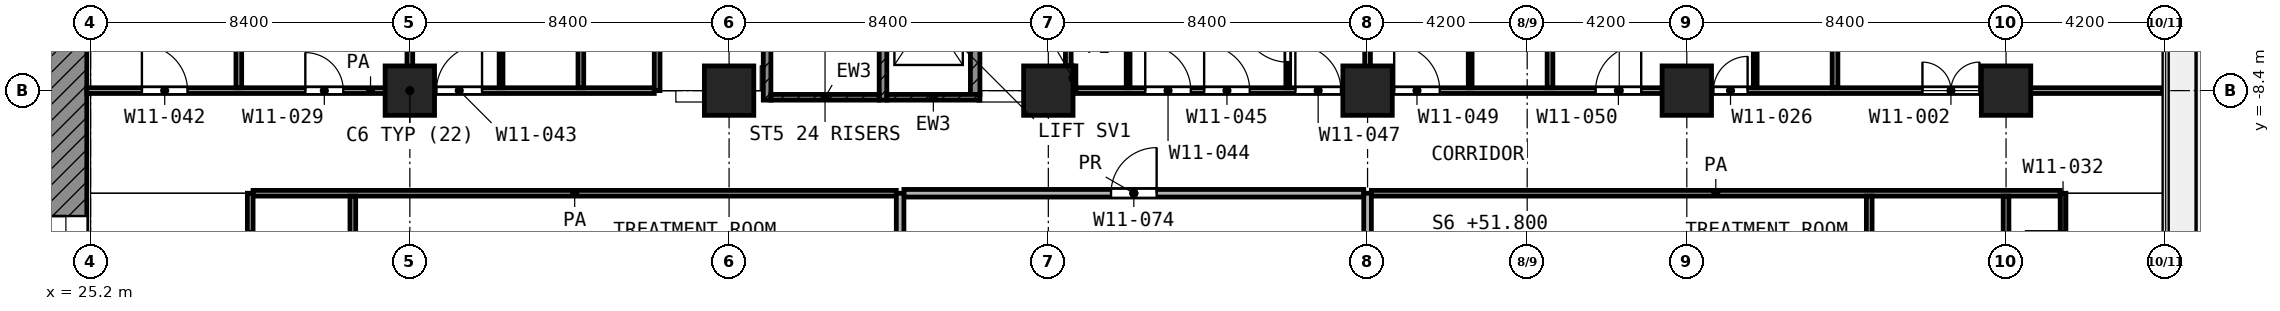
"""IFC4 building model, lengths in metres.
Left out: names, types, materials, properties, quantities, classifications, styles, units other than length and angle.
Written with IfcOpenShell. Run it as: python <this file> out.ifc"""

import sys

from ifc_helpers import new_model, si_unit, direction, frame, frame_2d, origin, origin_2d, place, context, subcontext, project, spatial, rectangle, extrude, element, fill, save


model = new_model("IFC4")
c1 = context("Model", 3, precision=1e-05, world=origin(), true_north=direction((0.0, 1.0)))
c2 = subcontext(c1, "Body", "Model", "MODEL_VIEW")
j1 = project(units=[si_unit("LENGTHUNIT", "METRE"), si_unit("PLANEANGLEUNIT", "RADIAN")], contexts=[c1])
p1 = place(None, origin())
s1 = spatial("IfcSite", under=j1, at=p1, CompositionType="ELEMENT")
p2 = place(p1, origin())
s2 = spatial("IfcBuilding", under=s1, at=p2, CompositionType="ELEMENT")
p3 = place(p2, frame((0.0, 0.0, 51.8)))
s3 = spatial("IfcBuildingStorey", under=s2, at=p3, CompositionType="ELEMENT", Elevation=51.8)
for number, where, z_axis, x_axis in (
    (1, (33.6, -8.4, 0.0), (0.0, 0.0, 1.0), (1.0, 0.0, 0.0)),
    (2, (42.0, -8.4, 0.0), (0.0, 0.0, 1.0), (1.0, 0.0, 0.0)),
    (3, (50.4, -8.4, 0.0), (0.0, 0.0, 1.0), (1.0, 0.0, 0.0)),
    (4, (58.8, -8.4, 0.0), (0.0, 0.0, 1.0), (1.0, 0.0, 0.0)),
    (5, (67.2, -8.4, 0.0), (0.0, 0.0, 1.0), (1.0, 0.0, 0.0)),
    (6, (75.6, -8.4, 0.0), (0.0, 0.0, 1.0), (1.0, 0.0, 0.0)),
):
    element("IfcColumn", number, at=place(p3, frame(where, z_axis=z_axis, x_axis=x_axis)), inside=s3, PredefinedType="COLUMN", context=c2, shape_type="SweptSolid", body=[
        extrude(rectangle(XDim=1.3, YDim=1.3, at=origin_2d()), origin(), (0.0, 0.0, 1.0), 4.2),
    ])
p4 = place(p3, frame((24.55, -24.0, 0.0), z_axis=(0.0, 0.0, 1.0), x_axis=(0.0, 1.0, 0.0)))
e7 = element("IfcWall", 7, at=p4, inside=s3, PredefinedType="SHEAR", context=c2, shape_type="SweptSolid", body=[
    extrude(rectangle(XDim=18.6, YDim=1.1, at=frame_2d((9.3, 0.0))), origin(), (0.0, 0.0, 1.0), 3.9),
])
p5 = place(p4, frame((10.5, 0.0, 0.0)))
e8 = element("IfcOpeningElement", 8, at=p5, cuts=e7, PredefinedType="OPENING", context=c2, shape_type="SweptSolid", body=[
    extrude(rectangle(XDim=1.8, YDim=2.1, at=frame_2d((0.9, 1.05))), frame((0.0, 0.56, 0.0), z_axis=(0.0, -1.0, 0.0), x_axis=(1.0, 0.0, 0.0)), (0.0, 0.0, 1.0), 1.12),
])
p6 = place(p3, frame((43.0, -8.65, 0.0), z_axis=(0.0, 0.0, 1.0), x_axis=(0.0, 1.0, 0.0)))
e9 = element("IfcWall", 9, at=p6, inside=s3, PredefinedType="SHEAR", context=c2, shape_type="SweptSolid", body=[
    extrude(rectangle(XDim=8.35, YDim=0.2, at=frame_2d((4.175, 0.0))), origin(), (0.0, 0.0, 1.0), 3.9),
])
p7 = place(p6, frame((7.0, 0.0, 0.0)))
e10 = element("IfcOpeningElement", 10, at=p7, cuts=e9, PredefinedType="OPENING", context=c2, shape_type="SweptSolid", body=[
    extrude(rectangle(XDim=1.1, YDim=2.1, at=frame_2d((0.55, 1.05))), frame((0.0, 0.11, 0.0), z_axis=(0.0, -1.0, 0.0), x_axis=(1.0, 0.0, 0.0)), (0.0, 0.0, 1.0), 0.22),
])
p8 = place(p3, frame((46.05, -8.65, 0.0), z_axis=(0.0, 0.0, 1.0), x_axis=(0.0, 1.0, 0.0)))
e11 = element("IfcWall", 11, at=p8, inside=s3, PredefinedType="SHEAR", context=c2, shape_type="SweptSolid", body=[
    extrude(rectangle(XDim=8.35, YDim=0.2, at=frame_2d((4.175, 0.0))), origin(), (0.0, 0.0, 1.0), 3.9),
])
p9 = place(p8, frame((7.0, 0.0, 0.0)))
e12 = element("IfcOpeningElement", 12, at=p9, cuts=e11, PredefinedType="OPENING", context=c2, shape_type="SweptSolid", body=[
    extrude(rectangle(XDim=1.1, YDim=2.1, at=frame_2d((0.55, 1.05))), frame((0.0, 0.11, 0.0), z_axis=(0.0, -1.0, 0.0), x_axis=(1.0, 0.0, 0.0)), (0.0, 0.0, 1.0), 0.22),
])
p10 = place(p3, frame((43.1, -8.575, 0.0), z_axis=(0.0, 0.0, 1.0), x_axis=(1.0, 0.0, 0.0)))
e13 = element("IfcWall", 13, at=p10, inside=s3, PredefinedType="SHEAR", context=c2, shape_type="SweptSolid", body=[
    extrude(rectangle(XDim=2.85, YDim=0.15, at=frame_2d((1.425, 0.0))), origin(), (0.0, 0.0, 1.0), 3.9),
])
p11 = place(p3, frame((46.15, -8.575, 0.0), z_axis=(0.0, 0.0, 1.0), x_axis=(1.0, 0.0, 0.0)))
e14 = element("IfcWall", 14, at=p11, inside=s3, PredefinedType="SHEAR", context=c2, shape_type="SweptSolid", body=[
    extrude(rectangle(XDim=2.45, YDim=0.15, at=frame_2d((1.225, 0.0))), origin(), (0.0, 0.0, 1.0), 3.9),
])
p12 = place(p3, frame((48.475, -8.5, 0.0), z_axis=(0.0, 0.0, 1.0), x_axis=(0.0, 1.0, 0.0)))
e15 = element("IfcWall", 15, at=p12, inside=s3, PredefinedType="SHEAR", context=c2, shape_type="SweptSolid", body=[
    extrude(rectangle(XDim=3.475, YDim=0.25, at=frame_2d((1.738, 0.0))), origin(), (0.0, 0.0, 1.0), 3.9),
])
for number, where, z_axis, x_axis in (
    (16, (36.0, -8.325, 0.0), (0.0, 0.0, 1.0), (0.0, 1.0, 0.0)),
    (17, (52.5, -8.325, 0.0), (0.0, 0.0, 1.0), (0.0, 1.0, 0.0)),
):
    element("IfcWall", number, at=place(p3, frame(where, z_axis=z_axis, x_axis=x_axis)), inside=s3, PredefinedType="PARTITIONING", context=c2, shape_type="SweptSolid", body=[
        extrude(rectangle(XDim=2.625, YDim=0.1, at=frame_2d((1.312, 0.0))), origin(), (0.0, 0.0, 1.0), 3.9),
    ])
p13 = place(p3, frame((56.7, -8.325, 0.0), z_axis=(0.0, 0.0, 1.0), x_axis=(0.0, 1.0, 0.0)))
e18 = element("IfcWall", 18, at=p13, inside=s3, PredefinedType="PARTITIONING", context=c2, shape_type="SweptSolid", body=[
    extrude(rectangle(XDim=2.625, YDim=0.1, at=frame_2d((1.312, 0.0))), origin(), (0.0, 0.0, 1.0), 3.9),
])
p14 = place(p13, frame((0.675, 0.0, 0.0)))
e19 = element("IfcOpeningElement", 19, at=p14, cuts=e18, PredefinedType="OPENING", context=c2, shape_type="SweptSolid", body=[
    extrude(rectangle(XDim=1.2, YDim=2.1, at=frame_2d((0.6, 1.05))), frame((0.0, 0.06, 0.0), z_axis=(0.0, -1.0, 0.0), x_axis=(1.0, 0.0, 0.0)), (0.0, 0.0, 1.0), 0.12),
])
p15 = place(p3, frame((61.5, -8.325, 0.0), z_axis=(0.0, 0.0, 1.0), x_axis=(0.0, 1.0, 0.0)))
e20 = element("IfcWall", 20, at=p15, inside=s3, PredefinedType="PARTITIONING", context=c2, shape_type="SweptSolid", body=[
    extrude(rectangle(XDim=3.225, YDim=0.1, at=frame_2d((1.612, 0.0))), origin(), (0.0, 0.0, 1.0), 3.9),
])
p16 = place(p3, frame((69.0, -8.325, 0.0), z_axis=(0.0, 0.0, 1.0), x_axis=(0.0, 1.0, 0.0)))
e21 = element("IfcWall", 21, at=p16, inside=s3, PredefinedType="PARTITIONING", context=c2, shape_type="SweptSolid", body=[
    extrude(rectangle(XDim=3.224, YDim=0.1, at=frame_2d((1.612, 0.0))), origin(), (0.0, 0.0, 1.0), 3.9),
])
p17 = place(p3, frame((29.475, -11.1, 0.0), z_axis=(0.0, 0.0, 1.0), x_axis=(1.0, 0.0, 0.0)))
e22 = element("IfcWall", 22, at=p17, inside=s3, PredefinedType="PARTITIONING", context=c2, shape_type="SweptSolid", body=[
    extrude(rectangle(XDim=16.925, YDim=0.15, at=frame_2d((8.462, 0.0))), origin(), (0.0, 0.0, 1.0), 3.9),
])
p18 = place(p3, frame((58.9, -11.1, 0.0), z_axis=(0.0, 0.0, 1.0), x_axis=(1.0, 0.0, 0.0)))
e23 = element("IfcWall", 23, at=p18, inside=s3, PredefinedType="PARTITIONING", context=c2, shape_type="SweptSolid", body=[
    extrude(rectangle(XDim=18.125, YDim=0.15, at=frame_2d((9.062, 0.0))), origin(), (0.0, 0.0, 1.0), 3.9),
])
p19 = place(p3, frame((25.1, -8.4, 0.0), z_axis=(0.0, 0.0, 1.0), x_axis=(1.0, 0.0, 0.0)))
e24 = element("IfcWall", 24, at=p19, inside=s3, PredefinedType="PARTITIONING", context=c2, shape_type="SweptSolid", body=[
    extrude(rectangle(XDim=14.932, YDim=0.15, at=frame_2d((7.466, 0.0))), origin(), (0.0, 0.0, 1.0), 3.9),
])
p20 = place(p19, frame((1.45, 0.0, 0.0)))
e25 = element("IfcOpeningElement", 25, at=p20, cuts=e24, PredefinedType="OPENING", context=c2, shape_type="SweptSolid", body=[
    extrude(rectangle(XDim=1.2, YDim=2.1, at=frame_2d((0.6, 1.05))), frame((0.0, 0.085, 0.0), z_axis=(0.0, -1.0, 0.0), x_axis=(1.0, 0.0, 0.0)), (0.0, 0.0, 1.0), 0.17),
])
p21 = place(p19, frame((5.75, 0.0, 0.0)))
e26 = element("IfcOpeningElement", 26, at=p21, cuts=e24, PredefinedType="OPENING", context=c2, shape_type="SweptSolid", body=[
    extrude(rectangle(XDim=1.0, YDim=2.1, at=frame_2d((0.5, 1.05))), frame((0.0, 0.085, 0.0), z_axis=(0.0, -1.0, 0.0), x_axis=(1.0, 0.0, 0.0)), (0.0, 0.0, 1.0), 0.17),
])
p22 = place(p19, frame((9.2, 0.0, 0.0)))
e27 = element("IfcOpeningElement", 27, at=p22, cuts=e24, PredefinedType="OPENING", context=c2, shape_type="SweptSolid", body=[
    extrude(rectangle(XDim=1.2, YDim=2.1, at=frame_2d((0.6, 1.05))), frame((0.0, 0.085, 0.0), z_axis=(0.0, -1.0, 0.0), x_axis=(1.0, 0.0, 0.0)), (0.0, 0.0, 1.0), 0.17),
])
p23 = place(p3, frame((51.125, -8.4, 0.0), z_axis=(0.0, 0.0, 1.0), x_axis=(1.0, 0.0, 0.0)))
e28 = element("IfcWall", 28, at=p23, inside=s3, PredefinedType="PARTITIONING", context=c2, shape_type="SweptSolid", body=[
    extrude(rectangle(XDim=28.595, YDim=0.15, at=frame_2d((14.297, 0.0))), origin(), (0.0, 0.0, 1.0), 3.9),
])
p24 = place(p23, frame((1.825, 0.0, 0.0)))
e29 = element("IfcOpeningElement", 29, at=p24, cuts=e28, PredefinedType="OPENING", context=c2, shape_type="SweptSolid", body=[
    extrude(rectangle(XDim=1.2, YDim=2.1, at=frame_2d((0.6, 1.05))), frame((0.0, 0.085, 0.0), z_axis=(0.0, -1.0, 0.0), x_axis=(1.0, 0.0, 0.0)), (0.0, 0.0, 1.0), 0.17),
])
p25 = place(p23, frame((3.375, 0.0, 0.0)))
e30 = element("IfcOpeningElement", 30, at=p25, cuts=e28, PredefinedType="OPENING", context=c2, shape_type="SweptSolid", body=[
    extrude(rectangle(XDim=1.2, YDim=2.1, at=frame_2d((0.6, 1.05))), frame((0.0, 0.085, 0.0), z_axis=(0.0, -1.0, 0.0), x_axis=(1.0, 0.0, 0.0)), (0.0, 0.0, 1.0), 0.17),
])
p26 = place(p23, frame((5.775, 0.0, 0.0)))
e31 = element("IfcOpeningElement", 31, at=p26, cuts=e28, PredefinedType="OPENING", context=c2, shape_type="SweptSolid", body=[
    extrude(rectangle(XDim=1.2, YDim=2.1, at=frame_2d((0.6, 1.05))), frame((0.0, 0.085, 0.0), z_axis=(0.0, -1.0, 0.0), x_axis=(1.0, 0.0, 0.0)), (0.0, 0.0, 1.0), 0.17),
])
p27 = place(p23, frame((8.375, 0.0, 0.0)))
e32 = element("IfcOpeningElement", 32, at=p27, cuts=e28, PredefinedType="OPENING", context=c2, shape_type="SweptSolid", body=[
    extrude(rectangle(XDim=1.2, YDim=2.1, at=frame_2d((0.6, 1.05))), frame((0.0, 0.085, 0.0), z_axis=(0.0, -1.0, 0.0), x_axis=(1.0, 0.0, 0.0)), (0.0, 0.0, 1.0), 0.17),
])
p28 = place(p23, frame((13.675, 0.0, 0.0)))
e33 = element("IfcOpeningElement", 33, at=p28, cuts=e28, PredefinedType="OPENING", context=c2, shape_type="SweptSolid", body=[
    extrude(rectangle(XDim=1.2, YDim=2.1, at=frame_2d((0.6, 1.05))), frame((0.0, 0.085, 0.0), z_axis=(0.0, -1.0, 0.0), x_axis=(1.0, 0.0, 0.0)), (0.0, 0.0, 1.0), 0.17),
])
p29 = place(p23, frame((16.775, 0.0, 0.0)))
e34 = element("IfcOpeningElement", 34, at=p29, cuts=e28, PredefinedType="OPENING", context=c2, shape_type="SweptSolid", body=[
    extrude(rectangle(XDim=0.9, YDim=2.1, at=frame_2d((0.45, 1.05))), frame((0.0, 0.085, 0.0), z_axis=(0.0, -1.0, 0.0), x_axis=(1.0, 0.0, 0.0)), (0.0, 0.0, 1.0), 0.17),
])
p30 = place(p23, frame((22.275, 0.0, 0.0)))
e35 = element("IfcOpeningElement", 35, at=p30, cuts=e28, PredefinedType="OPENING", context=c2, shape_type="SweptSolid", body=[
    extrude(rectangle(XDim=1.5, YDim=2.1, at=frame_2d((0.75, 1.05))), frame((0.0, 0.085, 0.0), z_axis=(0.0, -1.0, 0.0), x_axis=(1.0, 0.0, 0.0)), (0.0, 0.0, 1.0), 0.17),
])
p31 = place(p3, frame((29.1, -8.325, 0.0), z_axis=(0.0, 0.0, 1.0), x_axis=(0.0, 1.0, 0.0)))
e36 = element("IfcWall", 36, at=p31, inside=s3, PredefinedType="PARTITIONING", context=c2, shape_type="SweptSolid", body=[
    extrude(rectangle(XDim=8.245, YDim=0.15, at=frame_2d((4.123, 0.0))), origin(), (0.0, 0.0, 1.0), 3.9),
])
p32 = place(p3, frame((29.4, -14.1, 0.0), z_axis=(0.0, 0.0, 1.0), x_axis=(0.0, 1.0, 0.0)))
e37 = element("IfcWall", 37, at=p32, inside=s3, PredefinedType="PARTITIONING", context=c2, shape_type="SweptSolid", body=[
    extrude(rectangle(XDim=3.0, YDim=0.15, at=frame_2d((1.5, 0.0))), origin(), (0.0, 0.0, 1.0), 3.9),
])
p33 = place(p32, frame((1.0, 0.0, 0.0)))
e38 = element("IfcOpeningElement", 38, at=p33, cuts=e37, PredefinedType="OPENING", context=c2, shape_type="SweptSolid", body=[
    extrude(rectangle(XDim=1.0, YDim=2.1, at=frame_2d((0.5, 1.05))), frame((0.0, 0.085, 0.0), z_axis=(0.0, -1.0, 0.0), x_axis=(1.0, 0.0, 0.0)), (0.0, 0.0, 1.0), 0.17),
])
p34 = place(p3, frame((32.1, -14.025, 0.0), z_axis=(0.0, 0.0, 1.0), x_axis=(0.0, 1.0, 0.0)))
e39 = element("IfcWall", 39, at=p34, inside=s3, PredefinedType="PARTITIONING", context=c2, shape_type="SweptSolid", body=[
    extrude(rectangle(XDim=2.85, YDim=0.15, at=frame_2d((1.425, 0.0))), origin(), (0.0, 0.0, 1.0), 3.9),
])
for number, where, z_axis, x_axis in (
    (40, (33.6, -8.325, 0.0), (0.0, 0.0, 1.0), (0.0, 1.0, 0.0)),
    (41, (38.1, -8.325, 0.0), (0.0, 0.0, 1.0), (0.0, 1.0, 0.0)),
):
    element("IfcWall", number, at=place(p3, frame(where, z_axis=z_axis, x_axis=x_axis)), inside=s3, PredefinedType="PARTITIONING", context=c2, shape_type="SweptSolid", body=[
        extrude(rectangle(XDim=8.245, YDim=0.15, at=frame_2d((4.123, 0.0))), origin(), (0.0, 0.0, 1.0), 3.9),
    ])
p35 = place(p3, frame((40.107, -8.4, 0.0), z_axis=(0.0, 0.0, 1.0), x_axis=(0.0, 1.0, 0.0)))
e42 = element("IfcWall", 42, at=p35, inside=s3, PredefinedType="PARTITIONING", context=c2, shape_type="SweptSolid", body=[
    extrude(rectangle(XDim=8.048, YDim=0.15, at=frame_2d((4.024, 0.0))), origin(), (0.0, 0.0, 1.0), 3.9),
])
p36 = place(p35, frame((3.524, 0.0, 0.0)))
e43 = element("IfcOpeningElement", 43, at=p36, cuts=e42, PredefinedType="OPENING", context=c2, shape_type="SweptSolid", body=[
    extrude(rectangle(XDim=1.0, YDim=2.1, at=frame_2d((0.5, 1.05))), frame((0.0, 0.085, 0.0), z_axis=(0.0, -1.0, 0.0), x_axis=(1.0, 0.0, 0.0)), (0.0, 0.0, 1.0), 0.17),
])
p37 = place(p3, frame((50.925, -7.748, 0.0), z_axis=(0.0, 0.0, 1.0), x_axis=(0.0, 1.0, 0.0)))
e44 = element("IfcWall", 44, at=p37, inside=s3, PredefinedType="PARTITIONING", context=c2, shape_type="SweptSolid", body=[
    extrude(rectangle(XDim=5.898, YDim=0.15, at=frame_2d((2.949, 0.0))), origin(), (0.0, 0.0, 1.0), 3.9),
])
p38 = place(p37, frame((2.41, 0.0, 0.0)))
e45 = element("IfcOpeningElement", 45, at=p38, cuts=e44, PredefinedType="OPENING", context=c2, shape_type="SweptSolid", body=[
    extrude(rectangle(XDim=1.2, YDim=2.1, at=frame_2d((0.6, 1.05))), frame((0.0, 0.085, 0.0), z_axis=(0.0, -1.0, 0.0), x_axis=(1.0, 0.0, 0.0)), (0.0, 0.0, 1.0), 0.17),
])
p39 = place(p3, frame((51.05, -8.4, 0.0), z_axis=(0.0, 0.0, 1.0), x_axis=(0.0, 1.0, 0.0)))
e46 = element("IfcWall", 46, at=p39, inside=s3, PredefinedType="PARTITIONING", context=c2, shape_type="SweptSolid", body=[
    extrude(rectangle(XDim=0.65, YDim=0.15, at=frame_2d((0.325, 0.0))), origin(), (0.0, 0.0, 1.0), 3.9),
])
for number, where, z_axis, x_axis in (
    (47, (58.8, -8.325, 0.0), (0.0, 0.0, 1.0), (0.0, 1.0, 0.0)),
    (48, (63.6, -8.325, 0.0), (0.0, 0.0, 1.0), (0.0, 1.0, 0.0)),
    (49, (71.1, -8.325, 0.0), (0.0, 0.0, 1.0), (0.0, 1.0, 0.0)),
):
    element("IfcWall", number, at=place(p3, frame(where, z_axis=z_axis, x_axis=x_axis)), inside=s3, PredefinedType="PARTITIONING", context=c2, shape_type="SweptSolid", body=[
        extrude(rectangle(XDim=8.245, YDim=0.15, at=frame_2d((4.123, 0.0))), origin(), (0.0, 0.0, 1.0), 3.9),
    ])
for number, where, z_axis, x_axis in (
    (50, (72.0, -14.025, 0.0), (0.0, 0.0, 1.0), (0.0, 1.0, 0.0)),
    (51, (75.6, -14.025, 0.0), (0.0, 0.0, 1.0), (0.0, 1.0, 0.0)),
):
    element("IfcWall", number, at=place(p3, frame(where, z_axis=z_axis, x_axis=x_axis)), inside=s3, PredefinedType="PARTITIONING", context=c2, shape_type="SweptSolid", body=[
        extrude(rectangle(XDim=2.85, YDim=0.15, at=frame_2d((1.425, 0.0))), origin(), (0.0, 0.0, 1.0), 3.9),
    ])
p40 = place(p3, frame((77.1, -14.1, 0.0), z_axis=(0.0, 0.0, 1.0), x_axis=(0.0, 1.0, 0.0)))
e52 = element("IfcWall", 52, at=p40, inside=s3, PredefinedType="PARTITIONING", context=c2, shape_type="SweptSolid", body=[
    extrude(rectangle(XDim=3.0, YDim=0.15, at=frame_2d((1.5, 0.0))), origin(), (0.0, 0.0, 1.0), 3.9),
])
p41 = place(p40, frame((1.0, 0.0, 0.0)))
e53 = element("IfcOpeningElement", 53, at=p41, cuts=e52, PredefinedType="OPENING", context=c2, shape_type="SweptSolid", body=[
    extrude(rectangle(XDim=1.0, YDim=2.1, at=frame_2d((0.5, 1.05))), frame((0.0, 0.085, 0.0), z_axis=(0.0, -1.0, 0.0), x_axis=(1.0, 0.0, 0.0)), (0.0, 0.0, 1.0), 0.17),
])
p42 = place(p3, frame((46.6, -11.1, 0.0), z_axis=(0.0, 0.0, 1.0), x_axis=(1.0, 0.0, 0.0)))
e54 = element("IfcWall", 54, at=p42, inside=s3, PredefinedType="PARTITIONING", context=c2, shape_type="SweptSolid", body=[
    extrude(rectangle(XDim=12.1, YDim=0.2, at=frame_2d((6.05, 0.0))), origin(), (0.0, 0.0, 1.0), 3.9),
])
p43 = place(p42, frame((5.45, 0.0, 0.0)))
e55 = element("IfcOpeningElement", 55, at=p43, cuts=e54, PredefinedType="OPENING", context=c2, shape_type="SweptSolid", body=[
    extrude(rectangle(XDim=1.2, YDim=2.1, at=frame_2d((0.6, 1.05))), frame((0.0, 0.11, 0.0), z_axis=(0.0, -1.0, 0.0), x_axis=(1.0, 0.0, 0.0)), (0.0, 0.0, 1.0), 0.22),
])
for number, where, z_axis, x_axis in (
    (56, (46.5, -14.1, 0.0), (0.0, 0.0, 1.0), (0.0, 1.0, 0.0)),
    (57, (58.8, -14.1, 0.0), (0.0, 0.0, 1.0), (0.0, 1.0, 0.0)),
):
    element("IfcWall", number, at=place(p3, frame(where, z_axis=z_axis, x_axis=x_axis)), inside=s3, PredefinedType="PARTITIONING", context=c2, shape_type="SweptSolid", body=[
        extrude(rectangle(XDim=3.0, YDim=0.2, at=frame_2d((1.5, 0.0))), origin(), (0.0, 0.0, 1.0), 3.9),
    ])
p44 = place(p5, origin())
e58 = element("IfcDoor", 58, at=p44, inside=s3, OperationType="DOUBLE_DOOR_SINGLE_SWING", PredefinedType="DOOR", context=c2, shape_type="SweptSolid", body=[
    extrude(rectangle(XDim=1.8, YDim=2.1, at=frame_2d((0.9, 1.05))), frame((0.0, 0.025, 0.0), z_axis=(0.0, -1.0, 0.0), x_axis=(1.0, 0.0, 0.0)), (0.0, 0.0, 1.0), 0.05),
])
fill(e8, e58)
p45 = place(p20, origin())
e59 = element("IfcDoor", 59, at=p45, inside=s3, OperationType="SINGLE_SWING_LEFT", PredefinedType="DOOR", context=c2, shape_type="SweptSolid", body=[
    extrude(rectangle(XDim=1.2, YDim=2.1, at=frame_2d((0.6, 1.05))), frame((0.0, 0.025, 0.0), z_axis=(0.0, -1.0, 0.0), x_axis=(1.0, 0.0, 0.0)), (0.0, 0.0, 1.0), 0.05),
])
fill(e25, e59)
p46 = place(p21, origin())
e60 = element("IfcDoor", 60, at=p46, inside=s3, OperationType="SINGLE_SWING_LEFT", PredefinedType="DOOR", context=c2, shape_type="SweptSolid", body=[
    extrude(rectangle(XDim=1.0, YDim=2.1, at=frame_2d((0.5, 1.05))), frame((0.0, 0.025, 0.0), z_axis=(0.0, -1.0, 0.0), x_axis=(1.0, 0.0, 0.0)), (0.0, 0.0, 1.0), 0.05),
])
fill(e26, e60)
p47 = place(p22, origin())
e61 = element("IfcDoor", 61, at=p47, inside=s3, OperationType="SINGLE_SWING_RIGHT", PredefinedType="DOOR", context=c2, shape_type="SweptSolid", body=[
    extrude(rectangle(XDim=1.2, YDim=2.1, at=frame_2d((0.6, 1.05))), frame((0.0, 0.025, 0.0), z_axis=(0.0, -1.0, 0.0), x_axis=(1.0, 0.0, 0.0)), (0.0, 0.0, 1.0), 0.05),
])
fill(e27, e61)
p48 = place(p24, origin())
e62 = element("IfcDoor", 62, at=p48, inside=s3, OperationType="SINGLE_SWING_LEFT", PredefinedType="DOOR", context=c2, shape_type="SweptSolid", body=[
    extrude(rectangle(XDim=1.2, YDim=2.1, at=frame_2d((0.6, 1.05))), frame((0.0, 0.025, 0.0), z_axis=(0.0, -1.0, 0.0), x_axis=(1.0, 0.0, 0.0)), (0.0, 0.0, 1.0), 0.05),
])
fill(e29, e62)
p49 = place(p25, origin())
e63 = element("IfcDoor", 63, at=p49, inside=s3, OperationType="SINGLE_SWING_LEFT", PredefinedType="DOOR", context=c2, shape_type="SweptSolid", body=[
    extrude(rectangle(XDim=1.2, YDim=2.1, at=frame_2d((0.6, 1.05))), frame((0.0, 0.025, 0.0), z_axis=(0.0, -1.0, 0.0), x_axis=(1.0, 0.0, 0.0)), (0.0, 0.0, 1.0), 0.05),
])
fill(e30, e63)
p50 = place(p26, origin())
e64 = element("IfcDoor", 64, at=p50, inside=s3, OperationType="SINGLE_SWING_LEFT", PredefinedType="DOOR", context=c2, shape_type="SweptSolid", body=[
    extrude(rectangle(XDim=1.2, YDim=2.1, at=frame_2d((0.6, 1.05))), frame((0.0, 0.025, 0.0), z_axis=(0.0, -1.0, 0.0), x_axis=(1.0, 0.0, 0.0)), (0.0, 0.0, 1.0), 0.05),
])
fill(e31, e64)
p51 = place(p14, origin())
e65 = element("IfcDoor", 65, at=p51, inside=s3, OperationType="SINGLE_SWING_RIGHT", PredefinedType="DOOR", context=c2, shape_type="SweptSolid", body=[
    extrude(rectangle(XDim=1.2, YDim=2.1, at=frame_2d((0.6, 1.05))), frame((0.0, 0.025, 0.0), z_axis=(0.0, -1.0, 0.0), x_axis=(1.0, 0.0, 0.0)), (0.0, 0.0, 1.0), 0.05),
])
fill(e19, e65)
p52 = place(p27, origin())
e66 = element("IfcDoor", 66, at=p52, inside=s3, OperationType="SINGLE_SWING_LEFT", PredefinedType="DOOR", context=c2, shape_type="SweptSolid", body=[
    extrude(rectangle(XDim=1.2, YDim=2.1, at=frame_2d((0.6, 1.05))), frame((0.0, 0.025, 0.0), z_axis=(0.0, -1.0, 0.0), x_axis=(1.0, 0.0, 0.0)), (0.0, 0.0, 1.0), 0.05),
])
fill(e32, e66)
p53 = place(p28, origin())
e67 = element("IfcDoor", 67, at=p53, inside=s3, OperationType="SINGLE_SWING_RIGHT", PredefinedType="DOOR", context=c2, shape_type="SweptSolid", body=[
    extrude(rectangle(XDim=1.2, YDim=2.1, at=frame_2d((0.6, 1.05))), frame((0.0, 0.025, 0.0), z_axis=(0.0, -1.0, 0.0), x_axis=(1.0, 0.0, 0.0)), (0.0, 0.0, 1.0), 0.05),
])
fill(e33, e67)
p54 = place(p29, origin())
e68 = element("IfcDoor", 68, at=p54, inside=s3, OperationType="SINGLE_SWING_RIGHT", PredefinedType="DOOR", context=c2, shape_type="SweptSolid", body=[
    extrude(rectangle(XDim=0.9, YDim=2.1, at=frame_2d((0.45, 1.05))), frame((0.0, 0.025, 0.0), z_axis=(0.0, -1.0, 0.0), x_axis=(1.0, 0.0, 0.0)), (0.0, 0.0, 1.0), 0.05),
])
fill(e34, e68)
p55 = place(p30, origin())
e69 = element("IfcDoor", 69, at=p55, inside=s3, OperationType="DOUBLE_DOOR_SINGLE_SWING", PredefinedType="DOOR", context=c2, shape_type="SweptSolid", body=[
    extrude(rectangle(XDim=1.5, YDim=2.1, at=frame_2d((0.75, 1.05))), frame((0.0, 0.025, 0.0), z_axis=(0.0, -1.0, 0.0), x_axis=(1.0, 0.0, 0.0)), (0.0, 0.0, 1.0), 0.05),
])
fill(e35, e69)
p56 = place(p43, origin())
e70 = element("IfcDoor", 70, at=p56, inside=s3, OperationType="SINGLE_SWING_RIGHT", PredefinedType="DOOR", context=c2, shape_type="SweptSolid", body=[
    extrude(rectangle(XDim=1.2, YDim=2.1, at=frame_2d((0.6, 1.05))), frame((0.0, 0.025, 0.0), z_axis=(0.0, -1.0, 0.0), x_axis=(1.0, 0.0, 0.0)), (0.0, 0.0, 1.0), 0.05),
])
fill(e55, e70)
save(model, sys.argv[1])
